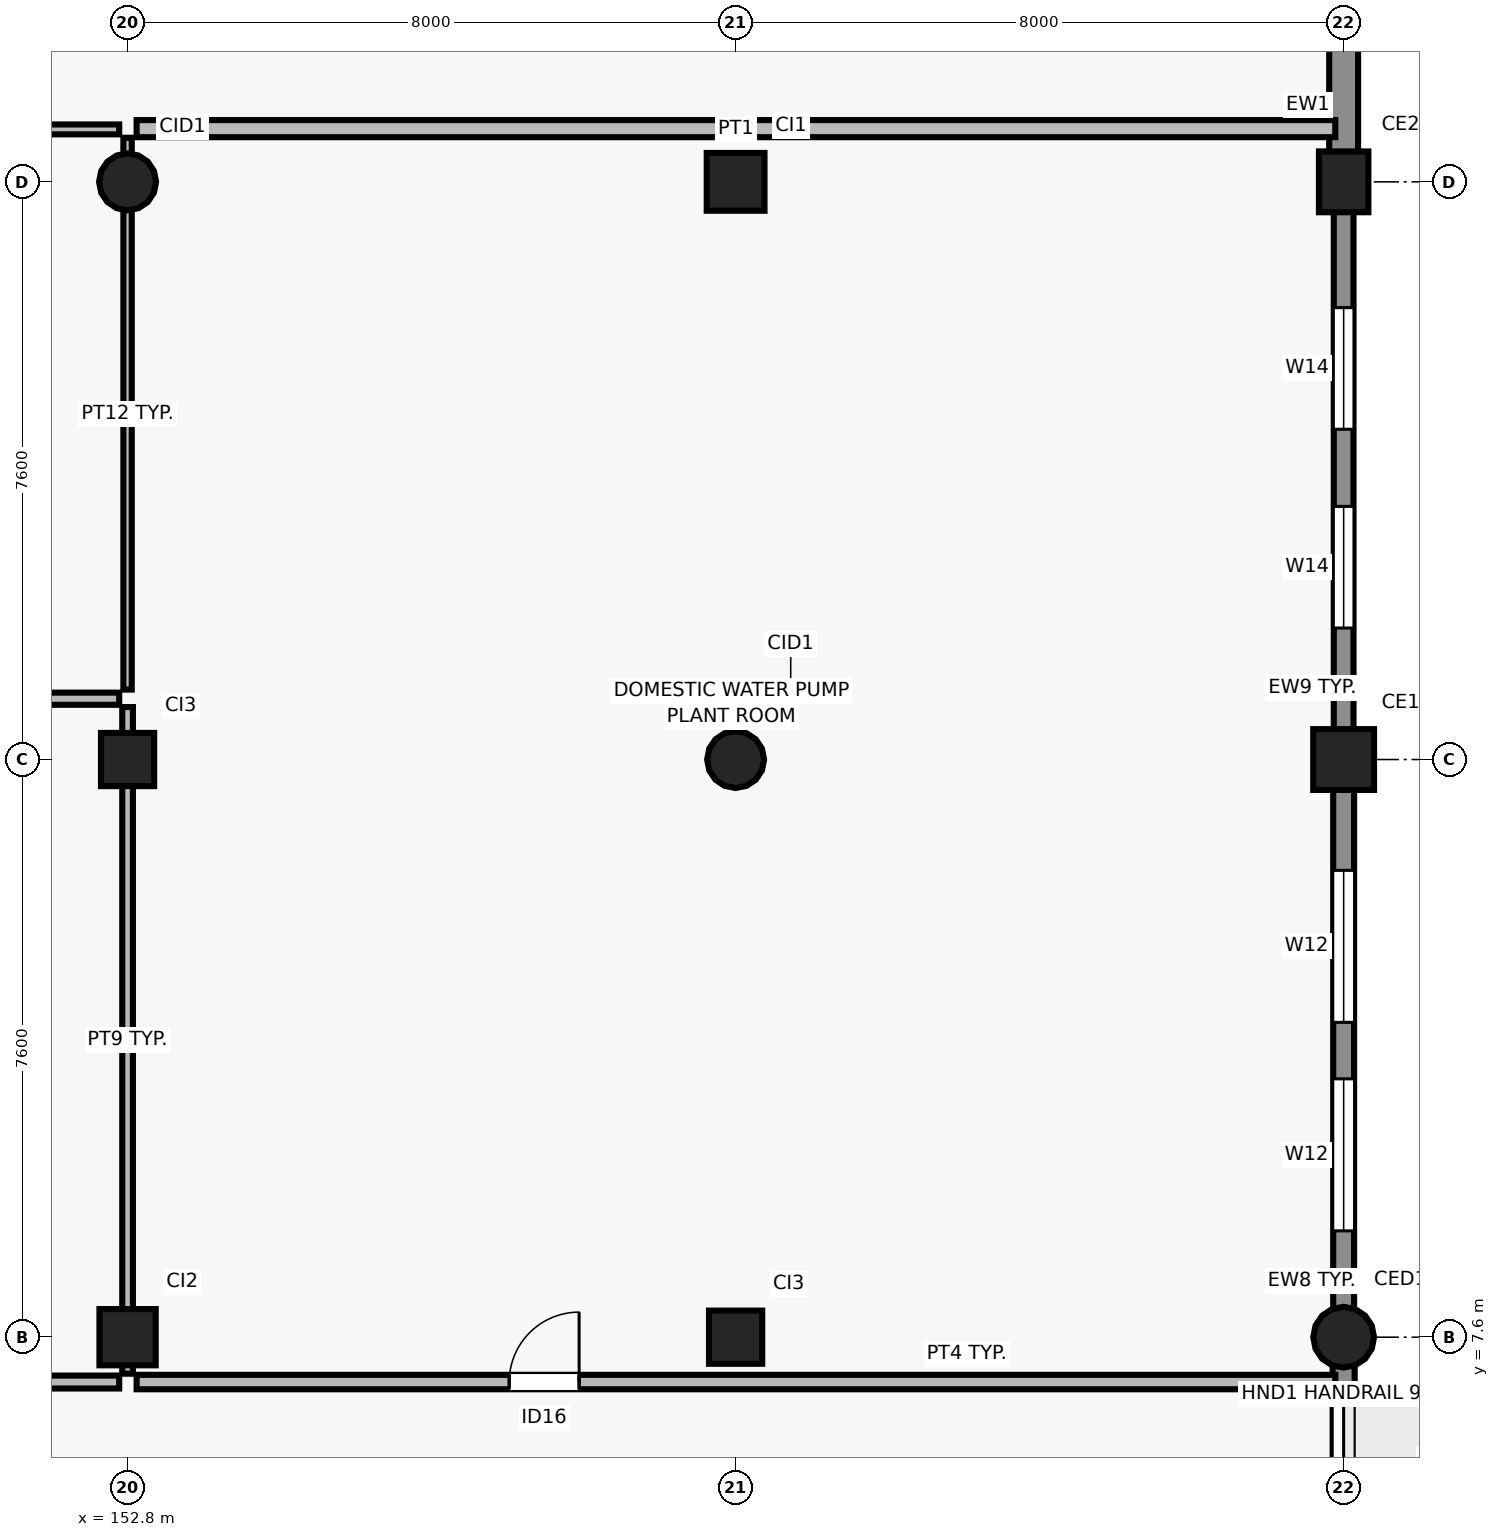
"""IFC4 building model, lengths in metres.
Left out: names, types, materials, properties, quantities, classifications, styles, units other than length and angle.
Written with IfcOpenShell. Run it as: python <this file> out.ifc"""

import sys

from ifc_helpers import new_model, si_unit, direction, frame, frame_2d, origin, origin_2d, place, context, subcontext, project, spatial, rectangle, circle, extrude, element, fill, save


model = new_model("IFC4")
c1 = context("Model", 3, precision=1e-05, world=origin(), true_north=direction((0.0, 1.0)))
c2 = subcontext(c1, "Body", "Model", "MODEL_VIEW")
j1 = project(units=[si_unit("LENGTHUNIT", "METRE"), si_unit("PLANEANGLEUNIT", "RADIAN")], contexts=[c1])
p1 = place(None, origin())
s1 = spatial("IfcSite", under=j1, at=p1, CompositionType="ELEMENT")
p2 = place(p1, origin())
s2 = spatial("IfcBuilding", under=s1, at=p2, CompositionType="ELEMENT")
p3 = place(p2, frame((0.0, 0.0, -4.2)))
s3 = spatial("IfcBuildingStorey", under=s2, at=p3, CompositionType="ELEMENT", Elevation=-4.2)
p4 = place(p3, frame((152.8, 7.6, 0.0), z_axis=(0.0, 0.0, 1.0), x_axis=(1.0, 0.0, 0.0)))
e1 = element("IfcColumn", 1, at=p4, inside=s3, PredefinedType="COLUMN", context=c2, shape_type="SweptSolid", body=[
    extrude(rectangle(XDim=0.74, YDim=0.74, at=origin_2d()), origin(), (0.0, 0.0, 1.0), 4.2),
])
p5 = place(p3, frame((152.8, 15.2, 0.0), z_axis=(0.0, 0.0, 1.0), x_axis=(1.0, 0.0, 0.0)))
e2 = element("IfcColumn", 2, at=p5, inside=s3, PredefinedType="COLUMN", context=c2, shape_type="SweptSolid", body=[
    extrude(rectangle(XDim=0.7, YDim=0.7, at=origin_2d()), origin(), (0.0, 0.0, 1.0), 4.2),
])
p6 = place(p3, frame((152.8, 22.8, 0.0), z_axis=(0.0, 0.0, 1.0), x_axis=(1.0, 0.0, 0.0)))
e3 = element("IfcColumn", 3, at=p6, inside=s3, PredefinedType="COLUMN", context=c2, shape_type="SweptSolid", body=[
    extrude(circle(Radius=0.375, at=origin_2d()), origin(), (0.0, 0.0, 1.0), 4.2),
])
p7 = place(p3, frame((160.8, 7.6, 0.0), z_axis=(0.0, 0.0, 1.0), x_axis=(1.0, 0.0, 0.0)))
e4 = element("IfcColumn", 4, at=p7, inside=s3, PredefinedType="COLUMN", context=c2, shape_type="SweptSolid", body=[
    extrude(rectangle(XDim=0.7, YDim=0.7, at=origin_2d()), origin(), (0.0, 0.0, 1.0), 4.2),
])
p8 = place(p3, frame((160.8, 15.2, 0.0), z_axis=(0.0, 0.0, 1.0), x_axis=(1.0, 0.0, 0.0)))
e5 = element("IfcColumn", 5, at=p8, inside=s3, PredefinedType="COLUMN", context=c2, shape_type="SweptSolid", body=[
    extrude(circle(Radius=0.375, at=origin_2d()), origin(), (0.0, 0.0, 1.0), 4.2),
])
p9 = place(p3, frame((160.8, 22.8, 0.0), z_axis=(0.0, 0.0, 1.0), x_axis=(1.0, 0.0, 0.0)))
e6 = element("IfcColumn", 6, at=p9, inside=s3, PredefinedType="COLUMN", context=c2, shape_type="SweptSolid", body=[
    extrude(rectangle(XDim=0.76, YDim=0.76, at=origin_2d()), origin(), (0.0, 0.0, 1.0), 4.2),
])
p10 = place(p3, frame((168.8, 7.6, 0.0), z_axis=(0.0, 0.0, 1.0), x_axis=(1.0, 0.0, 0.0)))
e7 = element("IfcColumn", 7, at=p10, inside=s3, PredefinedType="COLUMN", context=c2, shape_type="SweptSolid", body=[
    extrude(circle(Radius=0.4, at=origin_2d()), origin(), (0.0, 0.0, 1.0), 4.2),
])
p11 = place(p3, frame((168.8, 15.2, 0.0), z_axis=(0.0, 0.0, 1.0), x_axis=(1.0, 0.0, 0.0)))
e8 = element("IfcColumn", 8, at=p11, inside=s3, PredefinedType="COLUMN", context=c2, shape_type="SweptSolid", body=[
    extrude(rectangle(XDim=0.8, YDim=0.8, at=origin_2d()), origin(), (0.0, 0.0, 1.0), 4.2),
])
p12 = place(p3, frame((168.8, 22.8, 0.0), z_axis=(0.0, 0.0, 1.0), x_axis=(1.0, 0.0, 0.0)))
e9 = element("IfcColumn", 9, at=p12, inside=s3, PredefinedType="COLUMN", context=c2, shape_type="SweptSolid", body=[
    extrude(rectangle(XDim=0.8, YDim=0.65, at=origin_2d()), origin(), (0.0, 0.0, 1.0), 4.2),
])
p13 = place(p3, frame((168.8, 0.295, 0.0), z_axis=(0.0, 0.0, 1.0), x_axis=(0.0, 1.0, 0.0)))
e10 = element("IfcWall", 10, at=p13, inside=s3, PredefinedType="SOLIDWALL", context=c2, shape_type="SweptSolid", body=[
    extrude(rectangle(XDim=6.969, YDim=0.29, at=frame_2d((3.484, 0.0))), origin(), (0.0, 0.0, 1.0), 3.355),
])
p14 = place(p13, frame((0.748, 0.0, 0.9)))
e11 = element("IfcOpeningElement", 11, at=p14, cuts=e10, PredefinedType="OPENING", context=c2, shape_type="SweptSolid", body=[
    extrude(rectangle(XDim=2.4, YDim=1.5, at=frame_2d((1.2, 0.75))), frame((0.0, 0.155, 0.0), z_axis=(0.0, -1.0, 0.0), x_axis=(1.0, 0.0, 0.0)), (0.0, 0.0, 1.0), 0.31),
])
p15 = place(p13, frame((4.332, 0.0, 0.9)))
e12 = element("IfcOpeningElement", 12, at=p15, cuts=e10, PredefinedType="OPENING", context=c2, shape_type="SweptSolid", body=[
    extrude(rectangle(XDim=2.2, YDim=1.5, at=frame_2d((1.1, 0.75))), frame((0.0, 0.155, 0.0), z_axis=(0.0, -1.0, 0.0), x_axis=(1.0, 0.0, 0.0)), (0.0, 0.0, 1.0), 0.31),
])
p16 = place(p3, frame((168.8, 7.936, 0.0), z_axis=(0.0, 0.0, 1.0), x_axis=(0.0, 1.0, 0.0)))
e13 = element("IfcWall", 13, at=p16, inside=s3, PredefinedType="SOLIDWALL", context=c2, shape_type="SweptSolid", body=[
    extrude(rectangle(XDim=6.869, YDim=0.275, at=frame_2d((3.435, 0.0))), origin(), (0.0, 0.0, 1.0), 3.175),
])
p17 = place(p16, frame((1.063, 0.0, 0.9)))
e14 = element("IfcOpeningElement", 14, at=p17, cuts=e13, PredefinedType="OPENING", context=c2, shape_type="SweptSolid", body=[
    extrude(rectangle(XDim=2.0, YDim=1.5, at=frame_2d((1.0, 0.75))), frame((0.0, 0.147, 0.0), z_axis=(0.0, -1.0, 0.0), x_axis=(1.0, 0.0, 0.0)), (0.0, 0.0, 1.0), 0.295),
])
p18 = place(p16, frame((3.806, 0.0, 0.9)))
e15 = element("IfcOpeningElement", 15, at=p18, cuts=e13, PredefinedType="OPENING", context=c2, shape_type="SweptSolid", body=[
    extrude(rectangle(XDim=2.0, YDim=1.5, at=frame_2d((1.0, 0.75))), frame((0.0, 0.147, 0.0), z_axis=(0.0, -1.0, 0.0), x_axis=(1.0, 0.0, 0.0)), (0.0, 0.0, 1.0), 0.295),
])
p19 = place(p3, frame((168.8, 15.595, 0.0), z_axis=(0.0, 0.0, 1.0), x_axis=(0.0, 1.0, 0.0)))
e16 = element("IfcWall", 16, at=p19, inside=s3, PredefinedType="SOLIDWALL", context=c2, shape_type="SweptSolid", body=[
    extrude(rectangle(XDim=6.885, YDim=0.26, at=frame_2d((3.442, 0.0))), origin(), (0.0, 0.0, 1.0), 3.215),
])
p20 = place(p19, frame((1.335, 0.0, 0.9)))
e17 = element("IfcOpeningElement", 17, at=p20, cuts=e16, PredefinedType="OPENING", context=c2, shape_type="SweptSolid", body=[
    extrude(rectangle(XDim=1.6, YDim=1.5, at=frame_2d((0.8, 0.75))), frame((0.0, 0.14, 0.0), z_axis=(0.0, -1.0, 0.0), x_axis=(1.0, 0.0, 0.0)), (0.0, 0.0, 1.0), 0.28),
])
p21 = place(p19, frame((3.95, 0.0, 0.9)))
e18 = element("IfcOpeningElement", 18, at=p21, cuts=e16, PredefinedType="OPENING", context=c2, shape_type="SweptSolid", body=[
    extrude(rectangle(XDim=1.6, YDim=1.5, at=frame_2d((0.8, 0.75))), frame((0.0, 0.14, 0.0), z_axis=(0.0, -1.0, 0.0), x_axis=(1.0, 0.0, 0.0)), (0.0, 0.0, 1.0), 0.28),
])
p22 = place(p3, frame((168.8, 23.12, 0.0), z_axis=(0.0, 0.0, 1.0), x_axis=(0.0, 1.0, 0.0)))
e19 = element("IfcWall", 19, at=p22, inside=s3, PredefinedType="SOLIDWALL", context=c2, shape_type="SweptSolid", body=[
    extrude(rectangle(XDim=6.985, YDim=0.38, at=frame_2d((3.492, 0.0))), origin(), (0.0, 0.0, 1.0), 3.275),
])
p23 = place(p22, frame((1.635, 0.0, 0.9)))
e20 = element("IfcOpeningElement", 20, at=p23, cuts=e19, PredefinedType="OPENING", context=c2, shape_type="SweptSolid", body=[
    extrude(rectangle(XDim=1.2, YDim=1.5, at=frame_2d((0.6, 0.75))), frame((0.0, 0.2, 0.0), z_axis=(0.0, -1.0, 0.0), x_axis=(1.0, 0.0, 0.0)), (0.0, 0.0, 1.0), 0.4),
])
p24 = place(p22, frame((4.15, 0.0, 0.9)))
e21 = element("IfcOpeningElement", 21, at=p24, cuts=e19, PredefinedType="OPENING", context=c2, shape_type="SweptSolid", body=[
    extrude(rectangle(XDim=1.2, YDim=1.5, at=frame_2d((0.6, 0.75))), frame((0.0, 0.2, 0.0), z_axis=(0.0, -1.0, 0.0), x_axis=(1.0, 0.0, 0.0)), (0.0, 0.0, 1.0), 0.4),
])
p25 = place(p3, frame((134.52, 7.01, 0.0), z_axis=(0.0, 0.0, 1.0), x_axis=(1.0, 0.0, 0.0)))
e22 = element("IfcWall", 22, at=p25, inside=s3, PredefinedType="PARTITIONING", context=c2, shape_type="SweptSolid", body=[
    extrude(rectangle(XDim=18.17, YDim=0.17, at=frame_2d((9.085, 0.0))), origin(), (0.0, 0.0, 1.0), 3.9),
])
p26 = place(p25, frame((7.171, 0.0, 0.0)))
e23 = element("IfcOpeningElement", 23, at=p26, cuts=e22, PredefinedType="OPENING", context=c2, shape_type="SweptSolid", body=[
    extrude(rectangle(XDim=0.92, YDim=2.1, at=frame_2d((0.46, 1.05))), frame((0.0, 0.095, 0.0), z_axis=(0.0, -1.0, 0.0), x_axis=(1.0, 0.0, 0.0)), (0.0, 0.0, 1.0), 0.19),
])
p27 = place(p3, frame((134.52, 16.0, 0.0), z_axis=(0.0, 0.0, 1.0), x_axis=(1.0, 0.0, 0.0)))
e24 = element("IfcWall", 24, at=p27, inside=s3, PredefinedType="PARTITIONING", context=c2, shape_type="SweptSolid", body=[
    extrude(rectangle(XDim=18.17, YDim=0.16, at=frame_2d((9.085, 0.0))), origin(), (0.0, 0.0, 1.0), 3.9),
])
p28 = place(p3, frame((152.8, 7.12, 0.0), z_axis=(0.0, 0.0, 1.0), x_axis=(0.0, 1.0, 0.0)))
e25 = element("IfcWall", 25, at=p28, inside=s3, PredefinedType="PARTITIONING", context=c2, shape_type="SweptSolid", body=[
    extrude(rectangle(XDim=8.77, YDim=0.14, at=frame_2d((4.385, 0.0))), origin(), (0.0, 0.0, 1.0), 3.315),
])
p29 = place(p3, frame((134.52, 23.49, 0.0), z_axis=(0.0, 0.0, 1.0), x_axis=(1.0, 0.0, 0.0)))
e26 = element("IfcWall", 26, at=p29, inside=s3, PredefinedType="PARTITIONING", context=c2, shape_type="SweptSolid", body=[
    extrude(rectangle(XDim=18.17, YDim=0.13, at=frame_2d((9.085, 0.0))), origin(), (0.0, 0.0, 1.0), 3.9),
])
p30 = place(p29, frame((7.171, 0.0, 0.0)))
e27 = element("IfcOpeningElement", 27, at=p30, cuts=e26, PredefinedType="OPENING", context=c2, shape_type="SweptSolid", body=[
    extrude(rectangle(XDim=0.92, YDim=2.1, at=frame_2d((0.46, 1.05))), frame((0.0, 0.075, 0.0), z_axis=(0.0, -1.0, 0.0), x_axis=(1.0, 0.0, 0.0)), (0.0, 0.0, 1.0), 0.15),
])
p31 = place(p3, frame((152.8, 16.12, 0.0), z_axis=(0.0, 0.0, 1.0), x_axis=(0.0, 1.0, 0.0)))
e28 = element("IfcWall", 28, at=p31, inside=s3, PredefinedType="PARTITIONING", context=c2, shape_type="SweptSolid", body=[
    extrude(rectangle(XDim=7.26, YDim=0.11, at=frame_2d((3.63, 0.0))), origin(), (0.0, 0.0, 1.0), 3.345),
])
p32 = place(p3, frame((152.919, 7.01, 0.0), z_axis=(0.0, 0.0, 1.0), x_axis=(1.0, 0.0, 0.0)))
e29 = element("IfcWall", 29, at=p32, inside=s3, PredefinedType="PARTITIONING", context=c2, shape_type="SweptSolid", body=[
    extrude(rectangle(XDim=15.771, YDim=0.19, at=frame_2d((7.885, 0.0))), origin(), (0.0, 0.0, 1.0), 3.9),
])
p33 = place(p32, frame((4.902, 0.0, 0.0)))
e30 = element("IfcOpeningElement", 30, at=p33, cuts=e29, PredefinedType="OPENING", context=c2, shape_type="SweptSolid", body=[
    extrude(rectangle(XDim=0.92, YDim=2.1, at=frame_2d((0.46, 1.05))), frame((0.0, 0.105, 0.0), z_axis=(0.0, -1.0, 0.0), x_axis=(1.0, 0.0, 0.0)), (0.0, 0.0, 1.0), 0.21),
])
p34 = place(p3, frame((152.919, 23.5, 0.0), z_axis=(0.0, 0.0, 1.0), x_axis=(1.0, 0.0, 0.0)))
e31 = element("IfcWall", 31, at=p34, inside=s3, PredefinedType="PARTITIONING", context=c2, shape_type="SweptSolid", body=[
    extrude(rectangle(XDim=15.771, YDim=0.225, at=frame_2d((7.885, 0.0))), origin(), (0.0, 0.0, 1.0), 3.9),
])
p35 = place(p15, origin())
e32 = element("IfcWindow", 32, at=p35, inside=s3, PartitioningType="SINGLE_PANEL", PredefinedType="WINDOW", context=c2, shape_type="SweptSolid", body=[
    extrude(rectangle(XDim=2.2, YDim=1.5, at=frame_2d((1.1, 0.75))), frame((0.0, 0.03, 0.0), z_axis=(0.0, -1.0, 0.0), x_axis=(1.0, 0.0, 0.0)), (0.0, 0.0, 1.0), 0.06),
])
fill(e12, e32)
p36 = place(p17, origin())
e33 = element("IfcWindow", 33, at=p36, inside=s3, PartitioningType="SINGLE_PANEL", PredefinedType="WINDOW", context=c2, shape_type="SweptSolid", body=[
    extrude(rectangle(XDim=2.0, YDim=1.5, at=frame_2d((1.0, 0.75))), frame((0.0, 0.03, 0.0), z_axis=(0.0, -1.0, 0.0), x_axis=(1.0, 0.0, 0.0)), (0.0, 0.0, 1.0), 0.06),
])
fill(e14, e33)
p37 = place(p18, origin())
e34 = element("IfcWindow", 34, at=p37, inside=s3, PartitioningType="SINGLE_PANEL", PredefinedType="WINDOW", context=c2, shape_type="SweptSolid", body=[
    extrude(rectangle(XDim=2.0, YDim=1.5, at=frame_2d((1.0, 0.75))), frame((0.0, 0.03, 0.0), z_axis=(0.0, -1.0, 0.0), x_axis=(1.0, 0.0, 0.0)), (0.0, 0.0, 1.0), 0.06),
])
fill(e15, e34)
p38 = place(p20, origin())
e35 = element("IfcWindow", 35, at=p38, inside=s3, PartitioningType="SINGLE_PANEL", PredefinedType="WINDOW", context=c2, shape_type="SweptSolid", body=[
    extrude(rectangle(XDim=1.6, YDim=1.5, at=frame_2d((0.8, 0.75))), frame((0.0, 0.03, 0.0), z_axis=(0.0, -1.0, 0.0), x_axis=(1.0, 0.0, 0.0)), (0.0, 0.0, 1.0), 0.06),
])
fill(e17, e35)
p39 = place(p21, origin())
e36 = element("IfcWindow", 36, at=p39, inside=s3, PartitioningType="SINGLE_PANEL", PredefinedType="WINDOW", context=c2, shape_type="SweptSolid", body=[
    extrude(rectangle(XDim=1.6, YDim=1.5, at=frame_2d((0.8, 0.75))), frame((0.0, 0.03, 0.0), z_axis=(0.0, -1.0, 0.0), x_axis=(1.0, 0.0, 0.0)), (0.0, 0.0, 1.0), 0.06),
])
fill(e18, e36)
p40 = place(p33, origin())
e37 = element("IfcDoor", 37, at=p40, inside=s3, OperationType="SINGLE_SWING_RIGHT", PredefinedType="DOOR", context=c2, shape_type="SweptSolid", body=[
    extrude(rectangle(XDim=0.92, YDim=2.1, at=frame_2d((0.46, 1.05))), frame((0.0, 0.025, 0.0), z_axis=(0.0, -1.0, 0.0), x_axis=(1.0, 0.0, 0.0)), (0.0, 0.0, 1.0), 0.05),
])
fill(e30, e37)
save(model, sys.argv[1])
